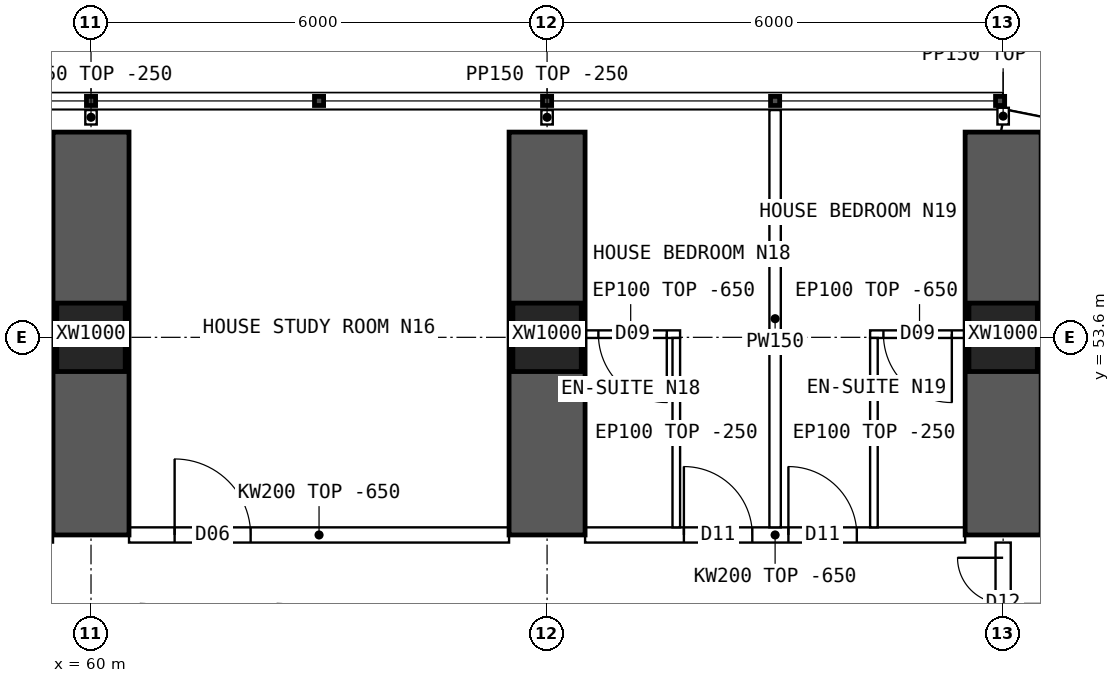
"""IFC4 building model, lengths in metres.
Left out: names, types, materials, properties, quantities, classifications, styles, units other than length and angle.
Written with IfcOpenShell. Run it as: python <this file> out.ifc"""

import sys

from ifc_helpers import new_model, si_unit, direction, frame, frame_2d, origin, origin_2d, place, context, subcontext, project, spatial, polyline, rectangle, hollow_rectangle, outline, extrude, element, fill, save


model = new_model("IFC4")
c1 = context("Model", 3, precision=1e-05, world=origin(), true_north=direction((0.0, 1.0)))
c2 = subcontext(c1, "Body", "Model", "MODEL_VIEW")
j1 = project(units=[si_unit("LENGTHUNIT", "METRE"), si_unit("PLANEANGLEUNIT", "RADIAN")], contexts=[c1])
p1 = place(None, origin())
s1 = spatial("IfcSite", under=j1, at=p1, CompositionType="ELEMENT")
p2 = place(p1, origin())
s2 = spatial("IfcBuilding", under=s1, at=p2, CompositionType="ELEMENT")
p3 = place(p2, frame((0.0, 0.0, 61.45)))
s3 = spatial("IfcBuildingStorey", under=s2, at=p3, CompositionType="ELEMENT", Elevation=61.45)
for number, where, z_axis, x_axis in (
    (1, (60.0, 53.6, 0.0), (0.0, 0.0, 1.0), (1.0, 0.0, 0.0)),
    (2, (66.0, 53.6, 0.0), (0.0, 0.0, 1.0), (1.0, 0.0, 0.0)),
    (3, (72.0, 53.6, 0.0), (0.0, 0.0, 1.0), (1.0, 0.0, 0.0)),
):
    element("IfcColumn", number, at=place(p3, frame(where, z_axis=z_axis, x_axis=x_axis)), inside=s3, PredefinedType="COLUMN", context=c2, shape_type="SweptSolid", body=[
        extrude(hollow_rectangle(XDim=0.9, YDim=0.9, WallThickness=0.09, at=origin_2d()), origin(), (0.0, 0.0, 1.0), 3.75),
    ])
for number, where, z_axis, x_axis in (
    (4, (60.0, 51.0, 0.0), (0.0, 0.0, 1.0), (0.0, 1.0, 0.0)),
    (5, (66.0, 51.0, 0.0), (0.0, 0.0, 1.0), (0.0, 1.0, 0.0)),
    (6, (72.0, 51.0, 0.0), (0.0, 0.0, 1.0), (0.0, 1.0, 0.0)),
):
    element("IfcWall", number, at=place(p3, frame(where, z_axis=z_axis, x_axis=x_axis)), inside=s3, PredefinedType="SHEAR", context=c2, shape_type="SweptSolid", body=[
        extrude(rectangle(XDim=5.3, YDim=1.0, at=frame_2d((2.65, 0.0))), origin(), (0.0, 0.0, 1.0), 3.75),
    ])
p4 = place(p3, frame((75.157, 55.822, 0.0), z_axis=(0.0, 0.0, 1.0), x_axis=(-0.980787251524, 0.195080412259, 0.0)))
e7 = element("IfcWall", 7, at=p4, inside=s3, PredefinedType="SOLIDWALL", context=c2, shape_type="SweptSolid", body=[
    extrude(outline(polyline([(-0.03, -0.15), (3.249, -0.15), (3.189, 0.15), (0.03, 0.15), (-0.03, -0.15)])), origin(), (0.0, 0.0, 1.0), 3.5),
])
p5 = place(p4, frame((0.909, 0.0, 0.9)))
e8 = element("IfcOpeningElement", 8, at=p5, cuts=e7, PredefinedType="OPENING", context=c2, shape_type="SweptSolid", body=[
    extrude(rectangle(XDim=1.4, YDim=1.8, at=frame_2d((0.7, 0.9))), frame((0.0, 0.16, 0.0), z_axis=(0.0, -1.0, 0.0), x_axis=(1.0, 0.0, 0.0)), (0.0, 0.0, 1.0), 0.32),
])
p6 = place(p3, frame((60.5, 51.0, 0.0), z_axis=(0.0, 0.0, 1.0), x_axis=(1.0, 0.0, 0.0)))
e9 = element("IfcWall", 9, at=p6, inside=s3, PredefinedType="SOLIDWALL", context=c2, shape_type="SweptSolid", body=[
    extrude(outline(polyline([(0.0, 0.0), (5.0, 0.0), (5.0, 3.1), (0.0, 3.1), (0.0, 0.0)])), frame((0.0, 0.1, 0.0), z_axis=(0.0, -1.0, 0.0), x_axis=(1.0, 0.0, 0.0)), (0.0, 0.0, 1.0), 0.2),
])
p7 = place(p6, frame((0.6, 0.0, 0.0)))
e10 = element("IfcOpeningElement", 10, at=p7, cuts=e9, PredefinedType="OPENING", context=c2, shape_type="SweptSolid", body=[
    extrude(rectangle(XDim=1.0, YDim=2.1, at=frame_2d((0.5, 1.05))), frame((0.0, 0.11, 0.0), z_axis=(0.0, -1.0, 0.0), x_axis=(1.0, 0.0, 0.0)), (0.0, 0.0, 1.0), 0.22),
])
p8 = place(p3, frame((66.5, 51.0, 0.0), z_axis=(0.0, 0.0, 1.0), x_axis=(1.0, 0.0, 0.0)))
e11 = element("IfcWall", 11, at=p8, inside=s3, PredefinedType="SOLIDWALL", context=c2, shape_type="SweptSolid", body=[
    extrude(outline(polyline([(0.0, 0.0), (5.0, 0.0), (5.0, 3.1), (0.0, 3.1), (0.0, 0.0)])), frame((0.0, 0.1, 0.0), z_axis=(0.0, -1.0, 0.0), x_axis=(1.0, 0.0, 0.0)), (0.0, 0.0, 1.0), 0.2),
])
p9 = place(p8, frame((1.3, 0.0, 0.0)))
e12 = element("IfcOpeningElement", 12, at=p9, cuts=e11, PredefinedType="OPENING", context=c2, shape_type="SweptSolid", body=[
    extrude(rectangle(XDim=0.9, YDim=2.1, at=frame_2d((0.45, 1.05))), frame((0.0, 0.11, 0.0), z_axis=(0.0, -1.0, 0.0), x_axis=(1.0, 0.0, 0.0)), (0.0, 0.0, 1.0), 0.22),
])
p10 = place(p8, frame((2.675, 0.0, 0.0)))
e13 = element("IfcOpeningElement", 13, at=p10, cuts=e11, PredefinedType="OPENING", context=c2, shape_type="SweptSolid", body=[
    extrude(rectangle(XDim=0.9, YDim=2.1, at=frame_2d((0.45, 1.05))), frame((0.0, 0.11, 0.0), z_axis=(0.0, -1.0, 0.0), x_axis=(1.0, 0.0, 0.0)), (0.0, 0.0, 1.0), 0.22),
])
p11 = place(p3, frame((69.0, 56.59, 0.0), z_axis=(0.0, 0.0, 1.0), x_axis=(0.0, -1.0, 0.0)))
e14 = element("IfcWall", 14, at=p11, inside=s3, PredefinedType="PARTITIONING", context=c2, shape_type="SweptSolid", body=[
    extrude(outline(polyline([(0.0, 0.0), (5.49, 0.0), (5.49, 3.1), (5.442, 3.1), (5.44, 3.5), (3.192, 3.5), (3.19, 3.1), (2.792, 3.1), (2.79, 3.5), (0.0, 3.5), (0.0, 0.0)])), frame((0.0, 0.075, 0.0), z_axis=(0.0, -1.0, 0.0), x_axis=(1.0, 0.0, 0.0)), (0.0, 0.0, 1.0), 0.15),
])
p12 = place(p3, frame((66.45, 53.642, 0.0), z_axis=(0.0, 0.0, 1.0), x_axis=(1.0, 0.0, 0.0)))
e15 = element("IfcWall", 15, at=p12, inside=s3, PredefinedType="PARTITIONING", context=c2, shape_type="SweptSolid", body=[
    extrude(outline(polyline([(0.0, 0.0), (1.3, 0.0), (1.3, 3.1), (0.0, 3.1), (0.0, 0.0)])), frame((0.0, 0.05, 0.0), z_axis=(0.0, -1.0, 0.0), x_axis=(1.0, 0.0, 0.0)), (0.0, 0.0, 1.0), 0.1),
])
p13 = place(p12, frame((0.225, 0.0, 0.0)))
e16 = element("IfcOpeningElement", 16, at=p13, cuts=e15, PredefinedType="OPENING", context=c2, shape_type="SweptSolid", body=[
    extrude(rectangle(XDim=0.9, YDim=2.1, at=frame_2d((0.45, 1.05))), frame((0.0, 0.06, 0.0), z_axis=(0.0, -1.0, 0.0), x_axis=(1.0, 0.0, 0.0)), (0.0, 0.0, 1.0), 0.12),
])
p14 = place(p3, frame((67.7, 53.592, 0.0), z_axis=(0.0, 0.0, 1.0), x_axis=(0.0, -1.0, 0.0)))
e17 = element("IfcWall", 17, at=p14, inside=s3, PredefinedType="PARTITIONING", context=c2, shape_type="SweptSolid", body=[
    extrude(outline(polyline([(0.0, 0.0), (2.492, 0.0), (2.492, 3.1), (2.444, 3.1), (2.442, 3.5), (0.194, 3.5), (0.192, 3.1), (0.0, 3.1), (0.0, 0.0)])), frame((0.0, 0.05, 0.0), z_axis=(0.0, -1.0, 0.0), x_axis=(1.0, 0.0, 0.0)), (0.0, 0.0, 1.0), 0.1),
])
p15 = place(p3, frame((70.25, 53.642, 0.0), z_axis=(0.0, 0.0, 1.0), x_axis=(1.0, 0.0, 0.0)))
e18 = element("IfcWall", 18, at=p15, inside=s3, PredefinedType="PARTITIONING", context=c2, shape_type="SweptSolid", body=[
    extrude(outline(polyline([(0.0, 0.0), (1.3, 0.0), (1.3, 3.1), (0.0, 3.1), (0.0, 0.0)])), frame((0.0, 0.05, 0.0), z_axis=(0.0, -1.0, 0.0), x_axis=(1.0, 0.0, 0.0)), (0.0, 0.0, 1.0), 0.1),
])
p16 = place(p15, frame((0.175, 0.0, 0.0)))
e19 = element("IfcOpeningElement", 19, at=p16, cuts=e18, PredefinedType="OPENING", context=c2, shape_type="SweptSolid", body=[
    extrude(rectangle(XDim=0.9, YDim=2.1, at=frame_2d((0.45, 1.05))), frame((0.0, 0.06, 0.0), z_axis=(0.0, -1.0, 0.0), x_axis=(1.0, 0.0, 0.0)), (0.0, 0.0, 1.0), 0.12),
])
p17 = place(p3, frame((70.3, 53.592, 0.0), z_axis=(0.0, 0.0, 1.0), x_axis=(0.0, -1.0, 0.0)))
e20 = element("IfcWall", 20, at=p17, inside=s3, PredefinedType="PARTITIONING", context=c2, shape_type="SweptSolid", body=[
    extrude(outline(polyline([(0.0, 0.0), (2.492, 0.0), (2.492, 3.1), (2.444, 3.1), (2.442, 3.5), (0.194, 3.5), (0.192, 3.1), (0.0, 3.1), (0.0, 0.0)])), frame((0.0, 0.05, 0.0), z_axis=(0.0, -1.0, 0.0), x_axis=(1.0, 0.0, 0.0)), (0.0, 0.0, 1.0), 0.1),
])
p18 = place(p3, frame((72.0, 49.3, 0.0), z_axis=(0.0, 0.0, 1.0), x_axis=(0.0, 1.0, 0.0)))
e21 = element("IfcWall", 21, at=p18, inside=s3, PredefinedType="SOLIDWALL", context=c2, shape_type="SweptSolid", body=[
    extrude(outline(polyline([(0.0, 0.0), (1.6, 0.0), (1.6, 3.05), (0.0, 3.05), (0.0, 0.0)])), frame((0.0, 0.1, 0.0), z_axis=(0.0, -1.0, 0.0), x_axis=(1.0, 0.0, 0.0)), (0.0, 0.0, 1.0), 0.2),
])
p19 = place(p18, frame((0.2, 0.0, 0.0)))
e22 = element("IfcOpeningElement", 22, at=p19, cuts=e21, PredefinedType="OPENING", context=c2, shape_type="SweptSolid", body=[
    extrude(rectangle(XDim=1.2, YDim=2.1, at=frame_2d((0.6, 1.05))), frame((0.0, 0.11, 0.0), z_axis=(0.0, -1.0, 0.0), x_axis=(1.0, 0.0, 0.0)), (0.0, 0.0, 1.0), 0.22),
])
for number, where, z_axis, x_axis in (
    (23, (60.0, 56.4, 0.0), (0.0, 0.0, 1.0), (0.0, 1.0, 0.0)),
    (24, (66.0, 56.4, 0.0), (0.0, 0.0, 1.0), (0.0, 1.0, 0.0)),
):
    element("IfcWall", number, at=place(p3, frame(where, z_axis=z_axis, x_axis=x_axis)), inside=s3, PredefinedType="PARTITIONING", context=c2, shape_type="SweptSolid", body=[
        extrude(rectangle(XDim=0.19, YDim=0.15, at=frame_2d((0.095, 0.0))), origin(), (0.0, 0.0, 1.0), 3.5),
    ])
p20 = place(p3, frame((72.0, 56.4, 0.0), z_axis=(0.0, 0.0, 1.0), x_axis=(0.0, 1.0, 0.0)))
e25 = element("IfcWall", 25, at=p20, inside=s3, PredefinedType="PARTITIONING", context=c2, shape_type="SweptSolid", body=[
    extrude(rectangle(XDim=0.22, YDim=0.15, at=frame_2d((0.11, 0.0))), origin(), (0.0, 0.0, 1.0), 3.5),
])
p21 = place(p7, origin())
e26 = element("IfcDoor", 26, at=p21, inside=s3, OperationType="SINGLE_SWING_LEFT", PredefinedType="DOOR", context=c2, shape_type="SweptSolid", body=[
    extrude(rectangle(XDim=1.0, YDim=2.1, at=frame_2d((0.5, 1.05))), frame((0.0, 0.025, 0.0), z_axis=(0.0, -1.0, 0.0), x_axis=(1.0, 0.0, 0.0)), (0.0, 0.0, 1.0), 0.05),
])
fill(e10, e26)
p22 = place(p13, origin())
e27 = element("IfcDoor", 27, at=p22, inside=s3, OperationType="SINGLE_SWING_RIGHT", PredefinedType="DOOR", context=c2, shape_type="SweptSolid", body=[
    extrude(rectangle(XDim=0.9, YDim=2.1, at=frame_2d((0.45, 1.05))), frame((0.0, 0.025, 0.0), z_axis=(0.0, -1.0, 0.0), x_axis=(1.0, 0.0, 0.0)), (0.0, 0.0, 1.0), 0.05),
])
fill(e16, e27)
p23 = place(p9, origin())
e28 = element("IfcDoor", 28, at=p23, inside=s3, OperationType="SINGLE_SWING_LEFT", PredefinedType="DOOR", context=c2, shape_type="SweptSolid", body=[
    extrude(rectangle(XDim=0.9, YDim=2.1, at=frame_2d((0.45, 1.05))), frame((0.0, 0.025, 0.0), z_axis=(0.0, -1.0, 0.0), x_axis=(1.0, 0.0, 0.0)), (0.0, 0.0, 1.0), 0.05),
])
fill(e12, e28)
p24 = place(p16, origin())
e29 = element("IfcDoor", 29, at=p24, inside=s3, OperationType="SINGLE_SWING_RIGHT", PredefinedType="DOOR", context=c2, shape_type="SweptSolid", body=[
    extrude(rectangle(XDim=0.9, YDim=2.1, at=frame_2d((0.45, 1.05))), frame((0.0, 0.025, 0.0), z_axis=(0.0, -1.0, 0.0), x_axis=(1.0, 0.0, 0.0)), (0.0, 0.0, 1.0), 0.05),
])
fill(e19, e29)
p25 = place(p10, origin())
e30 = element("IfcDoor", 30, at=p25, inside=s3, OperationType="SINGLE_SWING_LEFT", PredefinedType="DOOR", context=c2, shape_type="SweptSolid", body=[
    extrude(rectangle(XDim=0.9, YDim=2.1, at=frame_2d((0.45, 1.05))), frame((0.0, 0.025, 0.0), z_axis=(0.0, -1.0, 0.0), x_axis=(1.0, 0.0, 0.0)), (0.0, 0.0, 1.0), 0.05),
])
fill(e13, e30)
p26 = place(p19, origin())
e31 = element("IfcDoor", 31, at=p26, inside=s3, OperationType="DOUBLE_DOOR_SINGLE_SWING", PredefinedType="DOOR", context=c2, shape_type="SweptSolid", body=[
    extrude(rectangle(XDim=1.2, YDim=2.1, at=frame_2d((0.6, 1.05))), frame((0.0, 0.025, 0.0), z_axis=(0.0, -1.0, 0.0), x_axis=(1.0, 0.0, 0.0)), (0.0, 0.0, 1.0), 0.05),
])
fill(e22, e31)
save(model, sys.argv[1])
